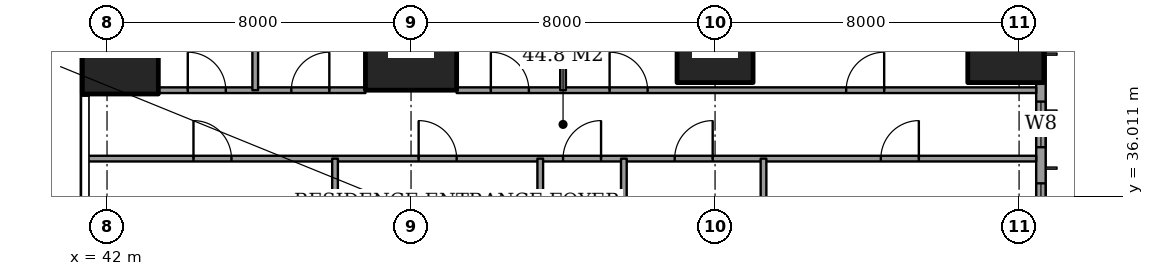
"""IFC4 building model, lengths in metres.
Left out: names, types, materials, properties, quantities, classifications, styles, units other than length and angle.
Written with IfcOpenShell. Run it as: python <this file> out.ifc"""

import sys

from ifc_helpers import new_model, si_unit, direction, frame, frame_2d, origin, origin_2d, place, context, subcontext, project, spatial, rectangle, extrude, element, fill, save


model = new_model("IFC4")
c1 = context("Model", 3, precision=1e-05, world=origin(), true_north=direction((0.0, 1.0)))
c2 = subcontext(c1, "Body", "Model", "MODEL_VIEW")
j1 = project(units=[si_unit("LENGTHUNIT", "METRE"), si_unit("PLANEANGLEUNIT", "RADIAN")], contexts=[c1])
p1 = place(None, origin())
s1 = spatial("IfcSite", under=j1, at=p1, CompositionType="ELEMENT")
p2 = place(p1, origin())
s2 = spatial("IfcBuilding", under=s1, at=p2, CompositionType="ELEMENT")
p3 = place(p2, frame((0.0, 0.0, 47.6)))
s3 = spatial("IfcBuildingStorey", under=s2, at=p3, CompositionType="ELEMENT", Elevation=47.6)
p4 = place(p3, frame((42.35, 40.0, 0.0), z_axis=(0.0, 0.0, 1.0), x_axis=(1.0, 0.0, 0.0)))
e1 = element("IfcColumn", 1, at=p4, inside=s3, PredefinedType="COLUMN", context=c2, shape_type="SweptSolid", body=[
    extrude(rectangle(XDim=2.0, YDim=2.6, at=origin_2d()), origin(), (0.0, 0.0, 1.0), 3.6),
])
p5 = place(p3, frame((50.0, 40.0, 0.0), z_axis=(0.0, 0.0, 1.0), x_axis=(1.0, 0.0, 0.0)))
e2 = element("IfcColumn", 2, at=p5, inside=s3, PredefinedType="COLUMN", context=c2, shape_type="SweptSolid", body=[
    extrude(rectangle(XDim=2.4, YDim=2.4, at=origin_2d()), origin(), (0.0, 0.0, 1.0), 3.6),
])
for number, where, z_axis, x_axis in (
    (3, (58.0, 40.0, 0.0), (0.0, 0.0, 1.0), (1.0, 0.0, 0.0)),
    (4, (65.65, 40.0, 0.0), (0.0, 0.0, 1.0), (1.0, 0.0, 0.0)),
):
    element("IfcColumn", number, at=place(p3, frame(where, z_axis=z_axis, x_axis=x_axis)), inside=s3, PredefinedType="COLUMN", context=c2, shape_type="SweptSolid", body=[
        extrude(rectangle(XDim=2.0, YDim=2.0, at=origin_2d()), origin(), (0.0, 0.0, 1.0), 3.6),
    ])
p6 = place(p3, frame((66.575, 3.175, 0.0), z_axis=(0.0, 0.0, 1.0), x_axis=(0.0, 1.0, 0.0)))
e5 = element("IfcWall", 5, at=p6, inside=s3, PredefinedType="SOLIDWALL", context=c2, shape_type="SweptSolid", body=[
    extrude(rectangle(XDim=41.65, YDim=0.25, at=frame_2d((20.825, 0.0))), origin(), (0.0, 0.0, 1.0), 3.6),
])
p7 = place(p6, frame((0.775, 0.0, 0.6)))
e6 = element("IfcOpeningElement", 6, at=p7, cuts=e5, PredefinedType="OPENING", context=c2, shape_type="SweptSolid", body=[
    extrude(rectangle(XDim=2.4, YDim=2.0, at=frame_2d((1.2, 1.0))), frame((0.0, 0.135, 0.0), z_axis=(0.0, -1.0, 0.0), x_axis=(1.0, 0.0, 0.0)), (0.0, 0.0, 1.0), 0.27),
])
p8 = place(p6, frame((6.125, 0.0, 0.6)))
e7 = element("IfcOpeningElement", 7, at=p8, cuts=e5, PredefinedType="OPENING", context=c2, shape_type="SweptSolid", body=[
    extrude(rectangle(XDim=1.2, YDim=2.0, at=frame_2d((0.6, 1.0))), frame((0.0, 0.135, 0.0), z_axis=(0.0, -1.0, 0.0), x_axis=(1.0, 0.0, 0.0)), (0.0, 0.0, 1.0), 0.27),
])
p9 = place(p6, frame((8.375, 0.0, 0.6)))
e8 = element("IfcOpeningElement", 8, at=p9, cuts=e5, PredefinedType="OPENING", context=c2, shape_type="SweptSolid", body=[
    extrude(rectangle(XDim=2.4, YDim=2.0, at=frame_2d((1.2, 1.0))), frame((0.0, 0.135, 0.0), z_axis=(0.0, -1.0, 0.0), x_axis=(1.0, 0.0, 0.0)), (0.0, 0.0, 1.0), 0.27),
])
p10 = place(p6, frame((15.775, 0.0, 0.6)))
e9 = element("IfcOpeningElement", 9, at=p10, cuts=e5, PredefinedType="OPENING", context=c2, shape_type="SweptSolid", body=[
    extrude(rectangle(XDim=2.4, YDim=2.0, at=frame_2d((1.2, 1.0))), frame((0.0, 0.135, 0.0), z_axis=(0.0, -1.0, 0.0), x_axis=(1.0, 0.0, 0.0)), (0.0, 0.0, 1.0), 0.27),
])
p11 = place(p6, frame((23.475, 0.0, 0.6)))
e10 = element("IfcOpeningElement", 10, at=p11, cuts=e5, PredefinedType="OPENING", context=c2, shape_type="SweptSolid", body=[
    extrude(rectangle(XDim=2.4, YDim=2.0, at=frame_2d((1.2, 1.0))), frame((0.0, 0.135, 0.0), z_axis=(0.0, -1.0, 0.0), x_axis=(1.0, 0.0, 0.0)), (0.0, 0.0, 1.0), 0.27),
])
p12 = place(p6, frame((30.775, 0.0, 0.6)))
e11 = element("IfcOpeningElement", 11, at=p12, cuts=e5, PredefinedType="OPENING", context=c2, shape_type="SweptSolid", body=[
    extrude(rectangle(XDim=2.4, YDim=2.0, at=frame_2d((1.2, 1.0))), frame((0.0, 0.135, 0.0), z_axis=(0.0, -1.0, 0.0), x_axis=(1.0, 0.0, 0.0)), (0.0, 0.0, 1.0), 0.27),
])
p13 = place(p6, frame((34.125, 0.0, 0.6)))
e12 = element("IfcOpeningElement", 12, at=p13, cuts=e5, PredefinedType="OPENING", context=c2, shape_type="SweptSolid", body=[
    extrude(rectangle(XDim=1.2, YDim=2.0, at=frame_2d((0.6, 1.0))), frame((0.0, 0.135, 0.0), z_axis=(0.0, -1.0, 0.0), x_axis=(1.0, 0.0, 0.0)), (0.0, 0.0, 1.0), 0.27),
])
p14 = place(p6, frame((38.475, 0.0, 0.6)))
e13 = element("IfcOpeningElement", 13, at=p14, cuts=e5, PredefinedType="OPENING", context=c2, shape_type="SweptSolid", body=[
    extrude(rectangle(XDim=2.4, YDim=2.0, at=frame_2d((1.2, 1.0))), frame((0.0, 0.135, 0.0), z_axis=(0.0, -1.0, 0.0), x_axis=(1.0, 0.0, 0.0)), (0.0, 0.0, 1.0), 0.27),
])
p15 = place(p3, frame((41.439, 37.0, 0.0), z_axis=(0.0, 0.0, 1.0), x_axis=(1.0, 0.0, 0.0)))
e14 = element("IfcWall", 14, at=p15, inside=s3, PredefinedType="PARTITIONING", context=c2, shape_type="SweptSolid", body=[
    extrude(rectangle(XDim=25.011, YDim=0.15, at=frame_2d((12.505, 0.0))), origin(), (0.0, 0.0, 1.0), 3.35),
])
p16 = place(p15, frame((12.561, 0.0, 0.0)))
e15 = element("IfcOpeningElement", 15, at=p16, cuts=e14, PredefinedType="OPENING", context=c2, shape_type="SweptSolid", body=[
    extrude(rectangle(XDim=1.0, YDim=2.1, at=frame_2d((0.5, 1.05))), frame((0.0, 0.085, 0.0), z_axis=(0.0, -1.0, 0.0), x_axis=(1.0, 0.0, 0.0)), (0.0, 0.0, 1.0), 0.17),
])
p17 = place(p15, frame((20.924, 0.0, 0.0)))
e16 = element("IfcOpeningElement", 16, at=p17, cuts=e14, PredefinedType="OPENING", context=c2, shape_type="SweptSolid", body=[
    extrude(rectangle(XDim=1.0, YDim=2.1, at=frame_2d((0.5, 1.05))), frame((0.0, 0.085, 0.0), z_axis=(0.0, -1.0, 0.0), x_axis=(1.0, 0.0, 0.0)), (0.0, 0.0, 1.0), 0.17),
])
p18 = place(p15, frame((15.499, 0.0, 0.0)))
e17 = element("IfcOpeningElement", 17, at=p18, cuts=e14, PredefinedType="OPENING", context=c2, shape_type="SweptSolid", body=[
    extrude(rectangle(XDim=1.0, YDim=2.1, at=frame_2d((0.5, 1.05))), frame((0.0, 0.085, 0.0), z_axis=(0.0, -1.0, 0.0), x_axis=(1.0, 0.0, 0.0)), (0.0, 0.0, 1.0), 0.17),
])
p19 = place(p15, frame((8.761, 0.0, 0.0)))
e18 = element("IfcOpeningElement", 18, at=p19, cuts=e14, PredefinedType="OPENING", context=c2, shape_type="SweptSolid", body=[
    extrude(rectangle(XDim=1.0, YDim=2.1, at=frame_2d((0.5, 1.05))), frame((0.0, 0.085, 0.0), z_axis=(0.0, -1.0, 0.0), x_axis=(1.0, 0.0, 0.0)), (0.0, 0.0, 1.0), 0.17),
])
p20 = place(p15, frame((2.836, 0.0, 0.0)))
e19 = element("IfcOpeningElement", 19, at=p20, cuts=e14, PredefinedType="OPENING", context=c2, shape_type="SweptSolid", body=[
    extrude(rectangle(XDim=1.0, YDim=2.1, at=frame_2d((0.5, 1.05))), frame((0.0, 0.085, 0.0), z_axis=(0.0, -1.0, 0.0), x_axis=(1.0, 0.0, 0.0)), (0.0, 0.0, 1.0), 0.17),
])
p21 = place(p3, frame((43.35, 38.8, 0.0), z_axis=(0.0, 0.0, 1.0), x_axis=(1.0, 0.0, 0.0)))
e20 = element("IfcWall", 20, at=p21, inside=s3, PredefinedType="PARTITIONING", context=c2, shape_type="SweptSolid", body=[
    extrude(rectangle(XDim=5.45, YDim=0.15, at=frame_2d((2.725, 0.0))), origin(), (0.0, 0.0, 1.0), 3.35),
])
p22 = place(p21, frame((3.5, 0.0, 0.0)))
e21 = element("IfcOpeningElement", 21, at=p22, cuts=e20, PredefinedType="OPENING", context=c2, shape_type="SweptSolid", body=[
    extrude(rectangle(XDim=1.0, YDim=2.1, at=frame_2d((0.5, 1.05))), frame((0.0, 0.085, 0.0), z_axis=(0.0, -1.0, 0.0), x_axis=(1.0, 0.0, 0.0)), (0.0, 0.0, 1.0), 0.17),
])
p23 = place(p21, frame((0.775, 0.0, 0.0)))
e22 = element("IfcOpeningElement", 22, at=p23, cuts=e20, PredefinedType="OPENING", context=c2, shape_type="SweptSolid", body=[
    extrude(rectangle(XDim=1.0, YDim=2.1, at=frame_2d((0.5, 1.05))), frame((0.0, 0.085, 0.0), z_axis=(0.0, -1.0, 0.0), x_axis=(1.0, 0.0, 0.0)), (0.0, 0.0, 1.0), 0.17),
])
p24 = place(p3, frame((51.2, 38.8, 0.0), z_axis=(0.0, 0.0, 1.0), x_axis=(1.0, 0.0, 0.0)))
e23 = element("IfcWall", 23, at=p24, inside=s3, PredefinedType="PARTITIONING", context=c2, shape_type="SweptSolid", body=[
    extrude(rectangle(XDim=15.25, YDim=0.15, at=frame_2d((7.625, 0.0))), origin(), (0.0, 0.0, 1.0), 3.35),
])
p25 = place(p24, frame((10.25, 0.0, 0.0)))
e24 = element("IfcOpeningElement", 24, at=p25, cuts=e23, PredefinedType="OPENING", context=c2, shape_type="SweptSolid", body=[
    extrude(rectangle(XDim=1.0, YDim=2.1, at=frame_2d((0.5, 1.05))), frame((0.0, 0.085, 0.0), z_axis=(0.0, -1.0, 0.0), x_axis=(1.0, 0.0, 0.0)), (0.0, 0.0, 1.0), 0.17),
])
p26 = place(p24, frame((4.025, 0.0, 0.0)))
e25 = element("IfcOpeningElement", 25, at=p26, cuts=e23, PredefinedType="OPENING", context=c2, shape_type="SweptSolid", body=[
    extrude(rectangle(XDim=1.0, YDim=2.1, at=frame_2d((0.5, 1.05))), frame((0.0, 0.085, 0.0), z_axis=(0.0, -1.0, 0.0), x_axis=(1.0, 0.0, 0.0)), (0.0, 0.0, 1.0), 0.17),
])
p27 = place(p24, frame((0.9, 0.0, 0.0)))
e26 = element("IfcOpeningElement", 26, at=p27, cuts=e23, PredefinedType="OPENING", context=c2, shape_type="SweptSolid", body=[
    extrude(rectangle(XDim=1.0, YDim=2.1, at=frame_2d((0.5, 1.05))), frame((0.0, 0.085, 0.0), z_axis=(0.0, -1.0, 0.0), x_axis=(1.0, 0.0, 0.0)), (0.0, 0.0, 1.0), 0.17),
])
p28 = place(p3, frame((45.9, 38.8, 0.0), z_axis=(0.0, 0.0, 1.0), x_axis=(0.0, 1.0, 0.0)))
e27 = element("IfcWall", 27, at=p28, inside=s3, PredefinedType="PARTITIONING", context=c2, shape_type="SweptSolid", body=[
    extrude(rectangle(XDim=9.65, YDim=0.15, at=frame_2d((4.825, 0.0))), origin(), (0.0, 0.0, 1.0), 3.35),
])
p29 = place(p3, frame((48.0, 31.5, 0.0), z_axis=(0.0, 0.0, 1.0), x_axis=(0.0, 1.0, 0.0)))
e28 = element("IfcWall", 28, at=p29, inside=s3, PredefinedType="PARTITIONING", context=c2, shape_type="SweptSolid", body=[
    extrude(rectangle(XDim=5.5, YDim=0.15, at=frame_2d((2.75, 0.0))), origin(), (0.0, 0.0, 1.0), 3.35),
])
p30 = place(p3, frame((53.4, 30.675, 0.0), z_axis=(0.0, 0.0, 1.0), x_axis=(0.0, 1.0, 0.0)))
e29 = element("IfcWall", 29, at=p30, inside=s3, PredefinedType="PARTITIONING", context=c2, shape_type="SweptSolid", body=[
    extrude(rectangle(XDim=6.325, YDim=0.15, at=frame_2d((3.163, 0.0))), origin(), (0.0, 0.0, 1.0), 3.35),
])
p31 = place(p3, frame((54.0, 38.8, 0.0), z_axis=(0.0, 0.0, 1.0), x_axis=(0.0, 1.0, 0.0)))
e30 = element("IfcWall", 30, at=p31, inside=s3, PredefinedType="PARTITIONING", context=c2, shape_type="SweptSolid", body=[
    extrude(rectangle(XDim=9.65, YDim=0.15, at=frame_2d((4.825, 0.0))), origin(), (0.0, 0.0, 1.0), 3.35),
])
p32 = place(p3, frame((55.6, 28.0, 0.0), z_axis=(0.0, 0.0, 1.0), x_axis=(0.0, 1.0, 0.0)))
e31 = element("IfcWall", 31, at=p32, inside=s3, PredefinedType="PARTITIONING", context=c2, shape_type="SweptSolid", body=[
    extrude(rectangle(XDim=9.0, YDim=0.15, at=frame_2d((4.5, 0.0))), origin(), (0.0, 0.0, 1.0), 3.35),
])
p33 = place(p32, frame((0.837, 0.0, 0.0)))
e32 = element("IfcOpeningElement", 32, at=p33, cuts=e31, PredefinedType="OPENING", context=c2, shape_type="SweptSolid", body=[
    extrude(rectangle(XDim=1.0, YDim=2.1, at=frame_2d((0.5, 1.05))), frame((0.0, 0.085, 0.0), z_axis=(0.0, -1.0, 0.0), x_axis=(1.0, 0.0, 0.0)), (0.0, 0.0, 1.0), 0.17),
])
p34 = place(p3, frame((59.275, 33.2, 0.0), z_axis=(0.0, 0.0, 1.0), x_axis=(0.0, 1.0, 0.0)))
e33 = element("IfcWall", 33, at=p34, inside=s3, PredefinedType="PARTITIONING", context=c2, shape_type="SweptSolid", body=[
    extrude(rectangle(XDim=3.8, YDim=0.15, at=frame_2d((1.9, 0.0))), origin(), (0.0, 0.0, 1.0), 3.35),
])
p35 = place(p12, origin())
e34 = element("IfcWindow", 34, at=p35, inside=s3, PartitioningType="SINGLE_PANEL", PredefinedType="WINDOW", context=c2, shape_type="SweptSolid", body=[
    extrude(rectangle(XDim=2.4, YDim=2.0, at=frame_2d((1.2, 1.0))), frame((0.0, 0.03, 0.0), z_axis=(0.0, -1.0, 0.0), x_axis=(1.0, 0.0, 0.0)), (0.0, 0.0, 1.0), 0.06),
])
fill(e11, e34)
p36 = place(p13, origin())
e35 = element("IfcWindow", 35, at=p36, inside=s3, PartitioningType="SINGLE_PANEL", PredefinedType="WINDOW", context=c2, shape_type="SweptSolid", body=[
    extrude(rectangle(XDim=1.2, YDim=2.0, at=frame_2d((0.6, 1.0))), frame((0.0, 0.03, 0.0), z_axis=(0.0, -1.0, 0.0), x_axis=(1.0, 0.0, 0.0)), (0.0, 0.0, 1.0), 0.06),
])
fill(e12, e35)
p37 = place(p25, origin())
e36 = element("IfcDoor", 36, at=p37, inside=s3, OperationType="SINGLE_SWING_LEFT", PredefinedType="DOOR", context=c2, shape_type="SweptSolid", body=[
    extrude(rectangle(XDim=1.0, YDim=2.1, at=frame_2d((0.5, 1.05))), frame((0.0, 0.025, 0.0), z_axis=(0.0, -1.0, 0.0), x_axis=(1.0, 0.0, 0.0)), (0.0, 0.0, 1.0), 0.05),
])
fill(e24, e36)
p38 = place(p26, origin())
e37 = element("IfcDoor", 37, at=p38, inside=s3, OperationType="SINGLE_SWING_RIGHT", PredefinedType="DOOR", context=c2, shape_type="SweptSolid", body=[
    extrude(rectangle(XDim=1.0, YDim=2.1, at=frame_2d((0.5, 1.05))), frame((0.0, 0.025, 0.0), z_axis=(0.0, -1.0, 0.0), x_axis=(1.0, 0.0, 0.0)), (0.0, 0.0, 1.0), 0.05),
])
fill(e25, e37)
p39 = place(p27, origin())
e38 = element("IfcDoor", 38, at=p39, inside=s3, OperationType="SINGLE_SWING_RIGHT", PredefinedType="DOOR", context=c2, shape_type="SweptSolid", body=[
    extrude(rectangle(XDim=1.0, YDim=2.1, at=frame_2d((0.5, 1.05))), frame((0.0, 0.025, 0.0), z_axis=(0.0, -1.0, 0.0), x_axis=(1.0, 0.0, 0.0)), (0.0, 0.0, 1.0), 0.05),
])
fill(e26, e38)
p40 = place(p22, origin())
e39 = element("IfcDoor", 39, at=p40, inside=s3, OperationType="SINGLE_SWING_LEFT", PredefinedType="DOOR", context=c2, shape_type="SweptSolid", body=[
    extrude(rectangle(XDim=1.0, YDim=2.1, at=frame_2d((0.5, 1.05))), frame((0.0, 0.025, 0.0), z_axis=(0.0, -1.0, 0.0), x_axis=(1.0, 0.0, 0.0)), (0.0, 0.0, 1.0), 0.05),
])
fill(e21, e39)
p41 = place(p23, origin())
e40 = element("IfcDoor", 40, at=p41, inside=s3, OperationType="SINGLE_SWING_RIGHT", PredefinedType="DOOR", context=c2, shape_type="SweptSolid", body=[
    extrude(rectangle(XDim=1.0, YDim=2.1, at=frame_2d((0.5, 1.05))), frame((0.0, 0.025, 0.0), z_axis=(0.0, -1.0, 0.0), x_axis=(1.0, 0.0, 0.0)), (0.0, 0.0, 1.0), 0.05),
])
fill(e22, e40)
p42 = place(p16, origin())
e41 = element("IfcDoor", 41, at=p42, inside=s3, OperationType="SINGLE_SWING_LEFT", PredefinedType="DOOR", context=c2, shape_type="SweptSolid", body=[
    extrude(rectangle(XDim=1.0, YDim=2.1, at=frame_2d((0.5, 1.05))), frame((0.0, 0.025, 0.0), z_axis=(0.0, -1.0, 0.0), x_axis=(1.0, 0.0, 0.0)), (0.0, 0.0, 1.0), 0.05),
])
fill(e15, e41)
p43 = place(p17, origin())
e42 = element("IfcDoor", 42, at=p43, inside=s3, OperationType="SINGLE_SWING_LEFT", PredefinedType="DOOR", context=c2, shape_type="SweptSolid", body=[
    extrude(rectangle(XDim=1.0, YDim=2.1, at=frame_2d((0.5, 1.05))), frame((0.0, 0.025, 0.0), z_axis=(0.0, -1.0, 0.0), x_axis=(1.0, 0.0, 0.0)), (0.0, 0.0, 1.0), 0.05),
])
fill(e16, e42)
p44 = place(p18, origin())
e43 = element("IfcDoor", 43, at=p44, inside=s3, OperationType="SINGLE_SWING_LEFT", PredefinedType="DOOR", context=c2, shape_type="SweptSolid", body=[
    extrude(rectangle(XDim=1.0, YDim=2.1, at=frame_2d((0.5, 1.05))), frame((0.0, 0.025, 0.0), z_axis=(0.0, -1.0, 0.0), x_axis=(1.0, 0.0, 0.0)), (0.0, 0.0, 1.0), 0.05),
])
fill(e17, e43)
p45 = place(p19, origin())
e44 = element("IfcDoor", 44, at=p45, inside=s3, OperationType="SINGLE_SWING_RIGHT", PredefinedType="DOOR", context=c2, shape_type="SweptSolid", body=[
    extrude(rectangle(XDim=1.0, YDim=2.1, at=frame_2d((0.5, 1.05))), frame((0.0, 0.025, 0.0), z_axis=(0.0, -1.0, 0.0), x_axis=(1.0, 0.0, 0.0)), (0.0, 0.0, 1.0), 0.05),
])
fill(e18, e44)
p46 = place(p20, origin())
e45 = element("IfcDoor", 45, at=p46, inside=s3, OperationType="SINGLE_SWING_RIGHT", PredefinedType="DOOR", context=c2, shape_type="SweptSolid", body=[
    extrude(rectangle(XDim=1.0, YDim=2.1, at=frame_2d((0.5, 1.05))), frame((0.0, 0.025, 0.0), z_axis=(0.0, -1.0, 0.0), x_axis=(1.0, 0.0, 0.0)), (0.0, 0.0, 1.0), 0.05),
])
fill(e19, e45)
save(model, sys.argv[1])
